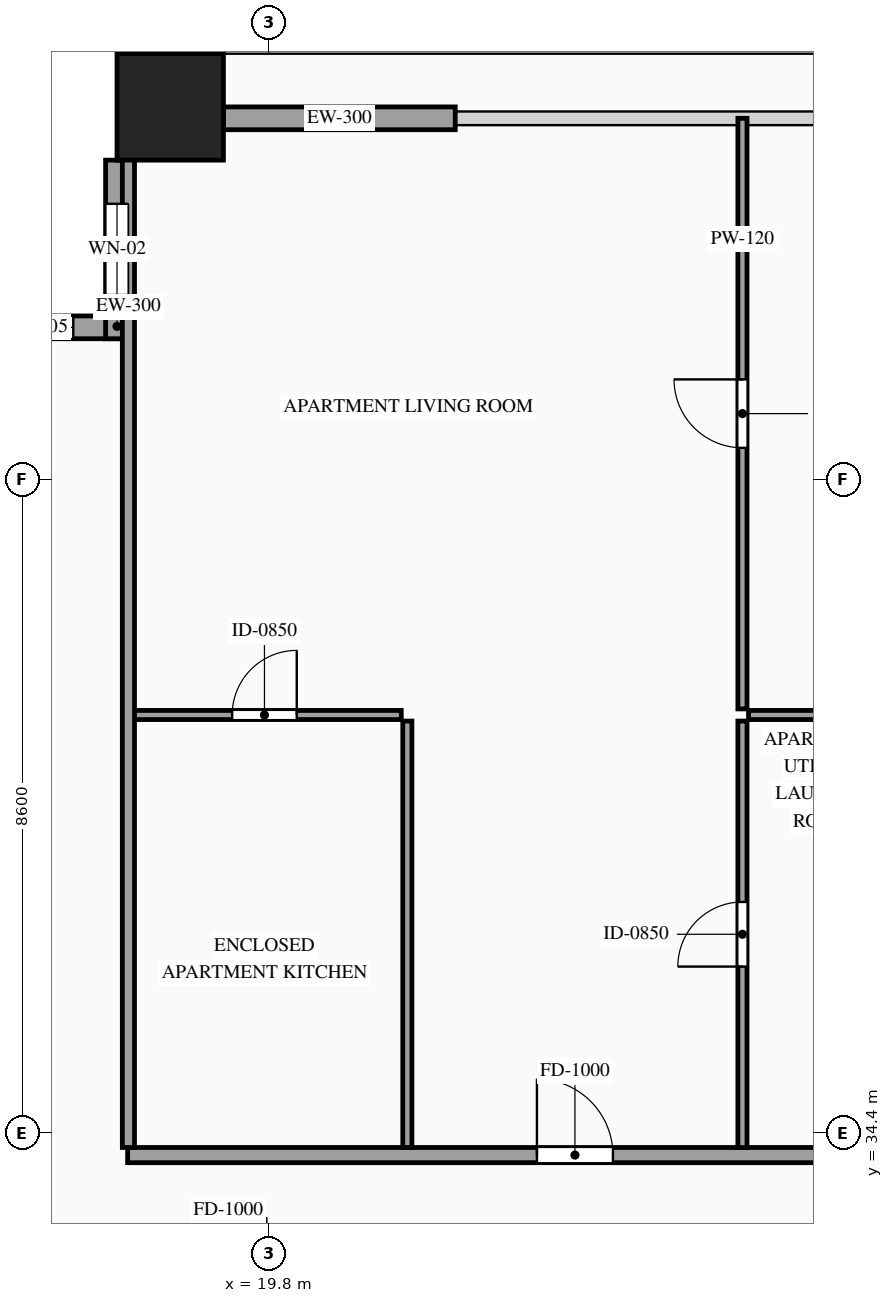
"""IFC4 building model, lengths in metres.
Left out: names, types, materials, properties, quantities, classifications, styles, units other than length and angle.
Written with IfcOpenShell. Run it as: python <this file> out.ifc"""

import sys

from ifc_helpers import new_model, si_unit, direction, frame, frame_2d, origin, origin_2d, place, context, subcontext, project, spatial, rectangle, hollow_rectangle, extrude, source, transform, mapped, element, fill, save


model = new_model("IFC4")
c1 = context("Model", 3, precision=1e-05, world=origin(), true_north=direction((0.0, 1.0)))
c2 = subcontext(c1, "Body", "Model", "MODEL_VIEW")
j1 = project(units=[si_unit("LENGTHUNIT", "METRE"), si_unit("PLANEANGLEUNIT", "RADIAN")], contexts=[c1])
p1 = place(None, origin())
s1 = spatial("IfcSite", under=j1, at=p1, CompositionType="ELEMENT")
p2 = place(p1, origin())
s2 = spatial("IfcBuilding", under=s1, at=p2, CompositionType="ELEMENT")
p3 = place(p2, frame((0.0, 0.0, 205.5)))
s3 = spatial("IfcBuildingStorey", under=s2, at=p3, CompositionType="ELEMENT", Elevation=205.5)
m1 = source(origin(), c2, "Body", "SweptSolid", [
    extrude(hollow_rectangle(XDim=1.4, YDim=1.4, WallThickness=0.06, at=origin_2d()), origin(), (0.0, 0.0, 1.0), 3.5),
])
p4 = place(p3, frame((18.5, 47.9, 0.0), z_axis=(0.0, 0.0, 1.0), x_axis=(1.0, 0.0, 0.0)))
e1 = element("IfcColumn", 1, at=p4, inside=s3, PredefinedType="COLUMN", context=c2, shape_type="MappedRepresentation", body=[
    mapped(m1, transform((0.0, 0.0, 0.0), scale=1.0)),
])
p5 = place(p3, frame((17.95, 45.0, 0.0), z_axis=(0.0, 0.0, 1.0), x_axis=(-1.0, 0.0, 0.0)))
e2 = element("IfcWall", 2, at=p5, inside=s3, PredefinedType="SOLIDWALL", context=c2, shape_type="SweptSolid", body=[
    extrude(rectangle(XDim=2.35, YDim=0.3, at=frame_2d((1.175, 0.0))), origin(), (0.0, 0.0, 1.0), 3.28),
])
p6 = place(p5, frame((0.725, 0.0, 0.85)))
e3 = element("IfcOpeningElement", 3, at=p6, cuts=e2, PredefinedType="OPENING", context=c2, shape_type="SweptSolid", body=[
    extrude(rectangle(XDim=0.9, YDim=1.5, at=frame_2d((0.45, 0.75))), frame((0.0, 0.165, 0.0), z_axis=(0.0, -1.0, 0.0), x_axis=(1.0, 0.0, 0.0)), (0.0, 0.0, 1.0), 0.33),
])
p7 = place(p3, frame((17.8, 47.2, 0.0), z_axis=(0.0, 0.0, 1.0), x_axis=(0.0, -1.0, 0.0)))
e4 = element("IfcWall", 4, at=p7, inside=s3, PredefinedType="SOLIDWALL", context=c2, shape_type="SweptSolid", body=[
    extrude(rectangle(XDim=2.35, YDim=0.3, at=frame_2d((1.175, 0.0))), origin(), (0.0, 0.0, 1.0), 3.28),
])
p8 = place(p7, frame((0.575, 0.0, 0.85)))
e5 = element("IfcOpeningElement", 5, at=p8, cuts=e4, PredefinedType="OPENING", context=c2, shape_type="SweptSolid", body=[
    extrude(rectangle(XDim=1.2, YDim=2.1, at=frame_2d((0.6, 1.05))), frame((0.0, 0.165, 0.0), z_axis=(0.0, -1.0, 0.0), x_axis=(1.0, 0.0, 0.0)), (0.0, 0.0, 1.0), 0.33),
])
m2 = source(origin(), c2, "Body", "SweptSolid", [
    extrude(rectangle(XDim=3.05, YDim=0.3, at=frame_2d((1.525, 0.0))), origin(), (0.0, 0.0, 1.0), 2.835),
])
p9 = place(p3, frame((19.2, 47.75, 0.0), z_axis=(0.0, 0.0, 1.0), x_axis=(1.0, 0.0, 0.0)))
e6 = element("IfcWall", 6, at=p9, inside=s3, PredefinedType="SOLIDWALL", context=c2, shape_type="MappedRepresentation", body=[
    mapped(m2, transform((0.0, 0.0, 0.0), scale=1.0)),
])
p10 = place(p3, frame((17.94, 34.11, 0.0), z_axis=(0.0, 0.0, 1.0), x_axis=(1.0, 0.0, 0.0)))
e7 = element("IfcWall", 7, at=p10, inside=s3, PredefinedType="PARTITIONING", context=c2, shape_type="SweptSolid", body=[
    extrude(rectangle(XDim=12.881, YDim=0.2, at=frame_2d((6.44, 0.0))), origin(), (0.0, 0.0, 1.0), 3.28),
])
p11 = place(p10, frame((5.385, 0.0, 0.0)))
e8 = element("IfcOpeningElement", 8, at=p11, cuts=e7, PredefinedType="OPENING", context=c2, shape_type="SweptSolid", body=[
    extrude(rectangle(XDim=1.0, YDim=2.2, at=frame_2d((0.5, 1.1))), frame((0.0, 0.115, 0.0), z_axis=(0.0, -1.0, 0.0), x_axis=(1.0, 0.0, 0.0)), (0.0, 0.0, 1.0), 0.23),
])
p12 = place(p3, frame((17.94, 39.9, 0.0), z_axis=(0.0, 0.0, 1.0), x_axis=(1.0, 0.0, 0.0)))
e9 = element("IfcWall", 9, at=p12, inside=s3, PredefinedType="PARTITIONING", context=c2, shape_type="SweptSolid", body=[
    extrude(rectangle(XDim=3.6, YDim=0.12, at=frame_2d((1.8, 0.0))), origin(), (0.0, 0.0, 1.0), 3.28),
])
p13 = place(p12, frame((1.375, 0.0, 0.0)))
e10 = element("IfcOpeningElement", 10, at=p13, cuts=e9, PredefinedType="OPENING", context=c2, shape_type="SweptSolid", body=[
    extrude(rectangle(XDim=0.85, YDim=2.1, at=frame_2d((0.425, 1.05))), frame((0.0, 0.075, 0.0), z_axis=(0.0, -1.0, 0.0), x_axis=(1.0, 0.0, 0.0)), (0.0, 0.0, 1.0), 0.15),
])
m3 = source(origin(), c2, "Body", "SweptSolid", [
    extrude(rectangle(XDim=5.61, YDim=0.12, at=frame_2d((2.805, 0.0))), origin(), (0.0, 0.0, 1.0), 3.28),
])
p14 = place(p3, frame((21.62, 34.21, 0.0), z_axis=(0.0, 0.0, 1.0), x_axis=(0.0, 1.0, 0.0)))
e11 = element("IfcWall", 11, at=p14, inside=s3, PredefinedType="PARTITIONING", context=c2, shape_type="MappedRepresentation", body=[
    mapped(m3, transform((0.0, 0.0, 0.0), scale=1.0)),
])
m4 = source(origin(), c2, "Body", "SweptSolid", [
    extrude(rectangle(XDim=4.712, YDim=0.12, at=frame_2d((2.356, 0.0))), origin(), (0.0, 0.0, 1.0), 2.875),
])
p15 = place(p3, frame((26.109, 39.9, 0.0), z_axis=(0.0, 0.0, 1.0), x_axis=(1.0, 0.0, 0.0)))
e12 = element("IfcWall", 12, at=p15, inside=s3, PredefinedType="PARTITIONING", context=c2, shape_type="MappedRepresentation", body=[
    mapped(m4, transform((0.0, 0.0, 0.0), scale=1.0)),
])
p16 = place(p3, frame((26.029, 39.98, 0.0), z_axis=(0.0, 0.0, 1.0), x_axis=(0.0, 1.0, 0.0)))
e13 = element("IfcWall", 13, at=p16, inside=s3, PredefinedType="PARTITIONING", context=c2, shape_type="SweptSolid", body=[
    extrude(rectangle(XDim=7.77, YDim=0.12, at=frame_2d((3.885, 0.0))), origin(), (0.0, 0.0, 1.0), 3.28),
])
p17 = place(p16, frame((3.435, 0.0, 0.0)))
e14 = element("IfcOpeningElement", 14, at=p17, cuts=e13, PredefinedType="OPENING", context=c2, shape_type="SweptSolid", body=[
    extrude(rectangle(XDim=0.9, YDim=2.15, at=frame_2d((0.45, 1.075))), frame((0.0, 0.075, 0.0), z_axis=(0.0, -1.0, 0.0), x_axis=(1.0, 0.0, 0.0)), (0.0, 0.0, 1.0), 0.15),
])
p18 = place(p3, frame((26.029, 34.21, 0.0), z_axis=(0.0, 0.0, 1.0), x_axis=(0.0, 1.0, 0.0)))
e15 = element("IfcWall", 15, at=p18, inside=s3, PredefinedType="PARTITIONING", context=c2, shape_type="SweptSolid", body=[
    extrude(rectangle(XDim=5.61, YDim=0.12, at=frame_2d((2.805, 0.0))), origin(), (0.0, 0.0, 1.0), 3.28),
])
p19 = place(p18, frame((2.38, 0.0, 0.0)))
e16 = element("IfcOpeningElement", 16, at=p19, cuts=e15, PredefinedType="OPENING", context=c2, shape_type="SweptSolid", body=[
    extrude(rectangle(XDim=0.85, YDim=2.1, at=frame_2d((0.425, 1.05))), frame((0.0, 0.075, 0.0), z_axis=(0.0, -1.0, 0.0), x_axis=(1.0, 0.0, 0.0)), (0.0, 0.0, 1.0), 0.15),
])
m5 = source(origin(), c2, "Body", "SweptSolid", [
    extrude(rectangle(XDim=13.39, YDim=0.16, at=frame_2d((6.695, 0.0))), origin(), (0.0, 0.0, 1.0), 3.28),
])
p20 = place(p3, frame((17.95, 34.21, 0.0), z_axis=(0.0, 0.0, 1.0), x_axis=(0.0, 1.0, 0.0)))
e17 = element("IfcWall", 17, at=p20, inside=s3, PredefinedType="PARTITIONING", context=c2, shape_type="MappedRepresentation", body=[
    mapped(m5, transform((0.0, 0.0, 0.0), scale=1.0)),
])
m6 = source(origin(), c2, "Body", "SweptSolid", [
    extrude(rectangle(XDim=0.9, YDim=1.5, at=frame_2d((0.45, 0.75))), frame((0.0, 0.03, 0.0), z_axis=(0.0, -1.0, 0.0), x_axis=(1.0, 0.0, 0.0)), (0.0, 0.0, 1.0), 0.06),
])
p21 = place(p6, origin())
e18 = element("IfcWindow", 18, at=p21, inside=s3, PartitioningType="SINGLE_PANEL", PredefinedType="WINDOW", context=c2, shape_type="MappedRepresentation", body=[
    mapped(m6, transform((0.0, 0.0, 0.0), scale=1.0)),
])
fill(e3, e18)
m7 = source(origin(), c2, "Body", "SweptSolid", [
    extrude(rectangle(XDim=1.2, YDim=2.1, at=frame_2d((0.6, 1.05))), frame((0.0, 0.03, 0.0), z_axis=(0.0, -1.0, 0.0), x_axis=(1.0, 0.0, 0.0)), (0.0, 0.0, 1.0), 0.06),
])
p22 = place(p8, origin())
e19 = element("IfcWindow", 19, at=p22, inside=s3, PartitioningType="SINGLE_PANEL", PredefinedType="WINDOW", context=c2, shape_type="MappedRepresentation", body=[
    mapped(m7, transform((0.0, 0.0, 0.0), scale=1.0)),
])
fill(e5, e19)
m8 = source(origin(), c2, "Body", "SweptSolid", [
    extrude(rectangle(XDim=1.0, YDim=2.2, at=frame_2d((0.5, 1.1))), frame((0.0, 0.025, 0.0), z_axis=(0.0, -1.0, 0.0), x_axis=(1.0, 0.0, 0.0)), (0.0, 0.0, 1.0), 0.05),
])
p23 = place(p11, origin())
e20 = element("IfcDoor", 20, at=p23, inside=s3, OperationType="SINGLE_SWING_LEFT", PredefinedType="DOOR", context=c2, shape_type="MappedRepresentation", body=[
    mapped(m8, transform((0.0, 0.0, 0.0), scale=1.0)),
])
fill(e8, e20)
m9 = source(origin(), c2, "Body", "SweptSolid", [
    extrude(rectangle(XDim=0.85, YDim=2.1, at=frame_2d((0.425, 1.05))), frame((0.0, 0.025, 0.0), z_axis=(0.0, -1.0, 0.0), x_axis=(1.0, 0.0, 0.0)), (0.0, 0.0, 1.0), 0.05),
])
p24 = place(p13, origin())
e21 = element("IfcDoor", 21, at=p24, inside=s3, OperationType="SINGLE_SWING_RIGHT", PredefinedType="DOOR", context=c2, shape_type="MappedRepresentation", body=[
    mapped(m9, transform((0.0, 0.0, 0.0), scale=1.0)),
])
fill(e10, e21)
m10 = source(origin(), c2, "Body", "SweptSolid", [
    extrude(rectangle(XDim=0.9, YDim=2.15, at=frame_2d((0.45, 1.075))), frame((0.0, 0.025, 0.0), z_axis=(0.0, -1.0, 0.0), x_axis=(1.0, 0.0, 0.0)), (0.0, 0.0, 1.0), 0.05),
])
p25 = place(p17, origin())
e22 = element("IfcDoor", 22, at=p25, inside=s3, OperationType="SINGLE_SWING_RIGHT", PredefinedType="DOOR", context=c2, shape_type="MappedRepresentation", body=[
    mapped(m10, transform((0.0, 0.0, 0.0), scale=1.0)),
])
fill(e14, e22)
p26 = place(p19, origin())
e23 = element("IfcDoor", 23, at=p26, inside=s3, OperationType="SINGLE_SWING_LEFT", PredefinedType="DOOR", context=c2, shape_type="MappedRepresentation", body=[
    mapped(m9, transform((0.0, 0.0, 0.0), scale=1.0)),
])
fill(e16, e23)
save(model, sys.argv[1])
